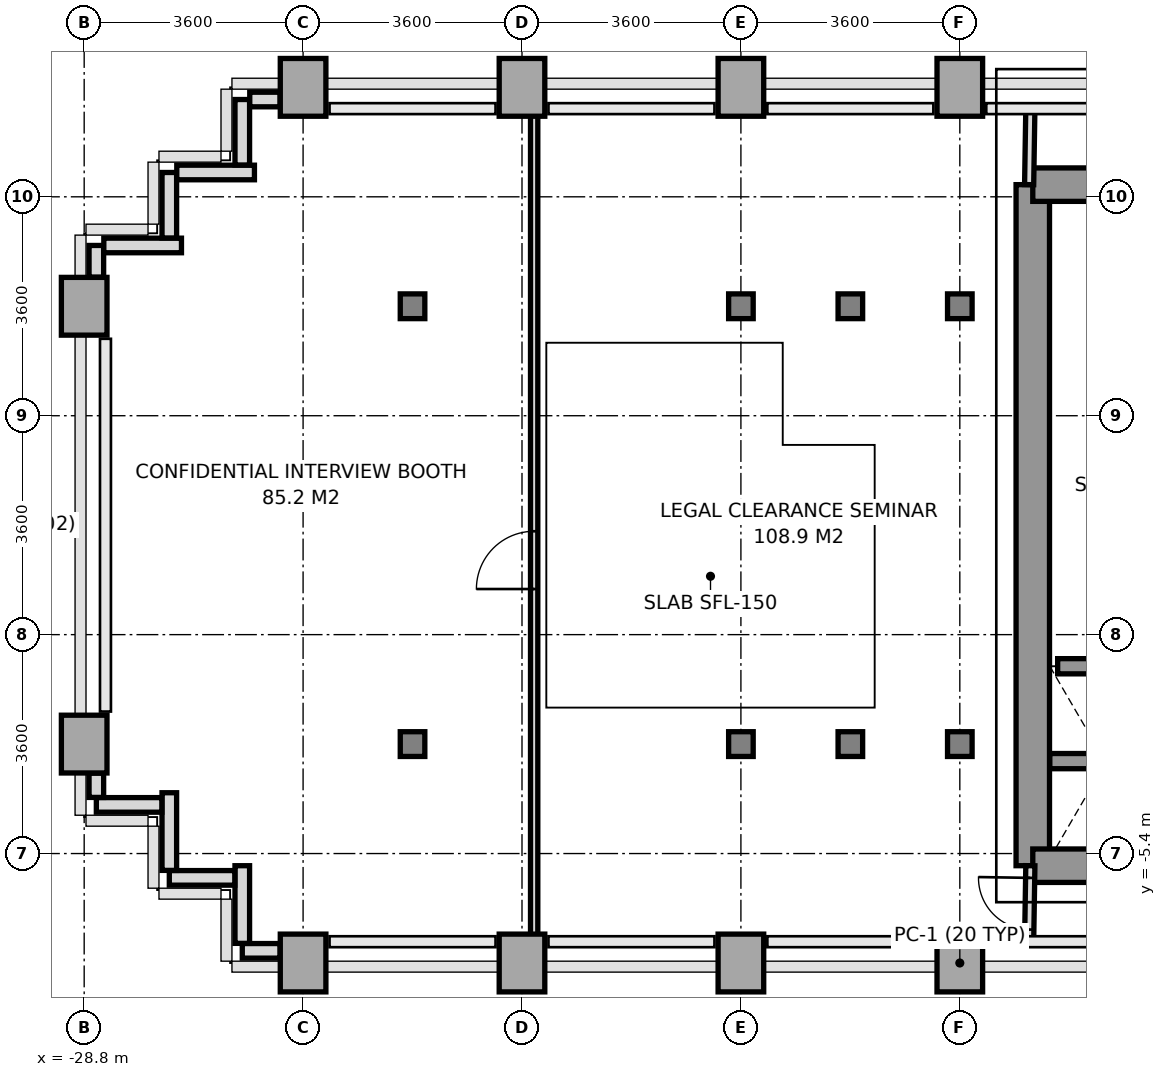
"""IFC4 building model, lengths in metres.
Left out: names, types, materials, properties, quantities, classifications, styles, units other than length and angle.
Written with IfcOpenShell. Run it as: python <this file> out.ifc"""

import sys

from ifc_helpers import new_model, si_unit, direction, frame, frame_2d, origin, origin_2d, place, context, subcontext, project, spatial, rectangle, i_section, extrude, source, transform, mapped, element, fill, save


model = new_model("IFC4")
c1 = context("Model", 3, precision=1e-05, world=origin(), true_north=direction((0.0, 1.0)))
c2 = subcontext(c1, "Body", "Model", "MODEL_VIEW")
j1 = project(units=[si_unit("LENGTHUNIT", "METRE"), si_unit("PLANEANGLEUNIT", "RADIAN")], contexts=[c1])
p1 = place(None, origin())
s1 = spatial("IfcSite", under=j1, at=p1, CompositionType="ELEMENT")
p2 = place(p1, origin())
s2 = spatial("IfcBuilding", under=s1, at=p2, CompositionType="ELEMENT")
p3 = place(p2, frame((0.0, 0.0, 61.2)))
s3 = spatial("IfcBuildingStorey", under=s2, at=p3, CompositionType="ELEMENT", Elevation=61.2)
m1 = source(origin(), c2, "Body", "SweptSolid", [
    extrude(rectangle(XDim=0.75, YDim=0.95, at=origin_2d()), origin(), (0.0, 0.0, 1.0), 3.2),
])
for number, where, z_axis, x_axis in (
    (1, (-28.8, -3.6, 0.0), (0.0, 0.0, 1.0), (1.0, 0.0, 0.0)),
    (2, (-28.8, 3.6, 0.0), (0.0, 0.0, 1.0), (1.0, 0.0, 0.0)),
    (3, (-25.2, -7.2, 0.0), (0.0, 0.0, 1.0), (1.0, 0.0, 0.0)),
    (4, (-25.2, 7.2, 0.0), (0.0, 0.0, 1.0), (1.0, 0.0, 0.0)),
):
    element("IfcColumn", number, at=place(p3, frame(where, z_axis=z_axis, x_axis=x_axis)), inside=s3, PredefinedType="COLUMN", context=c2, shape_type="MappedRepresentation", body=[
        mapped(m1, transform((0.0, 0.0, 0.0), x_axis=(1.0, 0.0, 0.0), y_axis=(0.0, 1.0, 0.0), z_axis=(0.0, 0.0, 1.0), scale=1.0)),
    ])
m2 = source(origin(), c2, "Body", "SweptSolid", [
    extrude(i_section(OverallWidth=0.404, OverallDepth=0.407, WebThickness=0.022, FlangeThickness=0.035, at=origin_2d()), origin(), (0.0, 0.0, 1.0), 3.2),
])
for number, where, z_axis, x_axis in (
    (5, (-23.4, -3.6, 0.0), (0.0, 0.0, 1.0), (1.0, 0.0, 0.0)),
    (6, (-23.4, 3.6, 0.0), (0.0, 0.0, 1.0), (1.0, 0.0, 0.0)),
):
    element("IfcColumn", number, at=place(p3, frame(where, z_axis=z_axis, x_axis=x_axis)), inside=s3, PredefinedType="COLUMN", context=c2, shape_type="MappedRepresentation", body=[
        mapped(m2, transform((0.0, 0.0, 0.0), x_axis=(1.0, 0.0, 0.0), y_axis=(0.0, 1.0, 0.0), z_axis=(0.0, 0.0, 1.0), scale=1.0)),
    ])
for number, where, z_axis, x_axis in (
    (7, (-21.6, -7.2, 0.0), (0.0, 0.0, 1.0), (1.0, 0.0, 0.0)),
    (8, (-21.6, 7.2, 0.0), (0.0, 0.0, 1.0), (1.0, 0.0, 0.0)),
    (9, (-18.0, -7.2, 0.0), (0.0, 0.0, 1.0), (1.0, 0.0, 0.0)),
):
    element("IfcColumn", number, at=place(p3, frame(where, z_axis=z_axis, x_axis=x_axis)), inside=s3, PredefinedType="COLUMN", context=c2, shape_type="MappedRepresentation", body=[
        mapped(m1, transform((0.0, 0.0, 0.0), x_axis=(1.0, 0.0, 0.0), y_axis=(0.0, 1.0, 0.0), z_axis=(0.0, 0.0, 1.0), scale=1.0)),
    ])
for number, where, z_axis, x_axis in (
    (10, (-18.0, -3.6, 0.0), (0.0, 0.0, 1.0), (1.0, 0.0, 0.0)),
    (11, (-18.0, 3.6, 0.0), (0.0, 0.0, 1.0), (1.0, 0.0, 0.0)),
):
    element("IfcColumn", number, at=place(p3, frame(where, z_axis=z_axis, x_axis=x_axis)), inside=s3, PredefinedType="COLUMN", context=c2, shape_type="MappedRepresentation", body=[
        mapped(m2, transform((0.0, 0.0, 0.0), x_axis=(1.0, 0.0, 0.0), y_axis=(0.0, 1.0, 0.0), z_axis=(0.0, 0.0, 1.0), scale=1.0)),
    ])
p4 = place(p3, frame((-18.0, 7.2, 0.0), z_axis=(0.0, 0.0, 1.0), x_axis=(1.0, 0.0, 0.0)))
e12 = element("IfcColumn", 12, at=p4, inside=s3, PredefinedType="COLUMN", context=c2, shape_type="MappedRepresentation", body=[
    mapped(m1, transform((0.0, 0.0, 0.0), x_axis=(1.0, 0.0, 0.0), y_axis=(0.0, 1.0, 0.0), z_axis=(0.0, 0.0, 1.0), scale=1.0)),
])
for number, where, z_axis, x_axis in (
    (13, (-16.2, -3.6, 0.0), (0.0, 0.0, 1.0), (1.0, 0.0, 0.0)),
    (14, (-16.2, 3.6, 0.0), (0.0, 0.0, 1.0), (1.0, 0.0, 0.0)),
):
    element("IfcColumn", number, at=place(p3, frame(where, z_axis=z_axis, x_axis=x_axis)), inside=s3, PredefinedType="COLUMN", context=c2, shape_type="MappedRepresentation", body=[
        mapped(m2, transform((0.0, 0.0, 0.0), x_axis=(1.0, 0.0, 0.0), y_axis=(0.0, 1.0, 0.0), z_axis=(0.0, 0.0, 1.0), scale=1.0)),
    ])
p5 = place(p3, frame((-14.4, -7.2, 0.0), z_axis=(0.0, 0.0, 1.0), x_axis=(1.0, 0.0, 0.0)))
e15 = element("IfcColumn", 15, at=p5, inside=s3, PredefinedType="COLUMN", context=c2, shape_type="MappedRepresentation", body=[
    mapped(m1, transform((0.0, 0.0, 0.0), x_axis=(1.0, 0.0, 0.0), y_axis=(0.0, 1.0, 0.0), z_axis=(0.0, 0.0, 1.0), scale=1.0)),
])
for number, where, z_axis, x_axis in (
    (16, (-14.4, -3.6, 0.0), (0.0, 0.0, 1.0), (1.0, 0.0, 0.0)),
    (17, (-14.4, 3.6, 0.0), (0.0, 0.0, 1.0), (1.0, 0.0, 0.0)),
):
    element("IfcColumn", number, at=place(p3, frame(where, z_axis=z_axis, x_axis=x_axis)), inside=s3, PredefinedType="COLUMN", context=c2, shape_type="MappedRepresentation", body=[
        mapped(m2, transform((0.0, 0.0, 0.0), x_axis=(1.0, 0.0, 0.0), y_axis=(0.0, 1.0, 0.0), z_axis=(0.0, 0.0, 1.0), scale=1.0)),
    ])
p6 = place(p3, frame((-14.4, 7.2, 0.0), z_axis=(0.0, 0.0, 1.0), x_axis=(1.0, 0.0, 0.0)))
e18 = element("IfcColumn", 18, at=p6, inside=s3, PredefinedType="COLUMN", context=c2, shape_type="MappedRepresentation", body=[
    mapped(m1, transform((0.0, 0.0, 0.0), x_axis=(1.0, 0.0, 0.0), y_axis=(0.0, 1.0, 0.0), z_axis=(0.0, 0.0, 1.0), scale=1.0)),
])
p7 = place(p3, frame((-25.578, -7.0, 0.0), z_axis=(0.0, 0.0, 1.0), x_axis=(-1.0, 0.0, 0.0)))
e19 = element("IfcWall", 19, at=p7, inside=s3, PredefinedType="PARAPET", context=c2, shape_type="SweptSolid", body=[
    extrude(rectangle(XDim=0.622, YDim=0.24, at=frame_2d((0.311, 0.0))), origin(), (0.0, 0.0, 1.0), 1.15),
])
p8 = place(p3, frame((-26.2, -6.877, 0.0), z_axis=(0.0, 0.0, 1.0), x_axis=(0.0, 1.0, 0.0)))
e20 = element("IfcWall", 20, at=p8, inside=s3, PredefinedType="PARAPET", context=c2, shape_type="SweptSolid", body=[
    extrude(rectangle(XDim=1.277, YDim=0.24, at=frame_2d((0.638, 0.0))), origin(), (0.0, 0.0, 1.0), 1.15),
])
p9 = place(p3, frame((-26.323, -5.8, 0.0), z_axis=(0.0, 0.0, 1.0), x_axis=(-1.0, 0.0, 0.0)))
e21 = element("IfcWall", 21, at=p9, inside=s3, PredefinedType="PARAPET", context=c2, shape_type="SweptSolid", body=[
    extrude(rectangle(XDim=1.077, YDim=0.24, at=frame_2d((0.539, 0.0))), origin(), (0.0, 0.0, 1.0), 1.15),
])
p10 = place(p3, frame((-27.4, -5.677, 0.0), z_axis=(0.0, 0.0, 1.0), x_axis=(0.0, 1.0, 0.0)))
e22 = element("IfcWall", 22, at=p10, inside=s3, PredefinedType="PARAPET", context=c2, shape_type="SweptSolid", body=[
    extrude(rectangle(XDim=1.277, YDim=0.24, at=frame_2d((0.639, 0.0))), origin(), (0.0, 0.0, 1.0), 1.15),
])
p11 = place(p3, frame((-27.523, -4.6, 0.0), z_axis=(0.0, 0.0, 1.0), x_axis=(-1.0, 0.0, 0.0)))
e23 = element("IfcWall", 23, at=p11, inside=s3, PredefinedType="PARAPET", context=c2, shape_type="SweptSolid", body=[
    extrude(rectangle(XDim=1.077, YDim=0.24, at=frame_2d((0.539, 0.0))), origin(), (0.0, 0.0, 1.0), 1.15),
])
p12 = place(p3, frame((-28.6, -4.477, 0.0), z_axis=(0.0, 0.0, 1.0), x_axis=(0.0, 1.0, 0.0)))
e24 = element("IfcWall", 24, at=p12, inside=s3, PredefinedType="PARAPET", context=c2, shape_type="SweptSolid", body=[
    extrude(rectangle(XDim=0.399, YDim=0.24, at=frame_2d((0.2, 0.0))), origin(), (0.0, 0.0, 1.0), 1.15),
])
p13 = place(p3, frame((-28.6, 4.078, 0.0), z_axis=(0.0, 0.0, 1.0), x_axis=(0.0, 1.0, 0.0)))
e25 = element("IfcWall", 25, at=p13, inside=s3, PredefinedType="PARAPET", context=c2, shape_type="SweptSolid", body=[
    extrude(rectangle(XDim=0.522, YDim=0.24, at=frame_2d((0.261, 0.0))), origin(), (0.0, 0.0, 1.0), 1.15),
])
p14 = place(p3, frame((-28.477, 4.6, 0.0), z_axis=(0.0, 0.0, 1.0), x_axis=(1.0, 0.0, 0.0)))
e26 = element("IfcWall", 26, at=p14, inside=s3, PredefinedType="PARAPET", context=c2, shape_type="SweptSolid", body=[
    extrude(rectangle(XDim=1.277, YDim=0.24, at=frame_2d((0.639, 0.0))), origin(), (0.0, 0.0, 1.0), 1.15),
])
p15 = place(p3, frame((-27.4, 4.723, 0.0), z_axis=(0.0, 0.0, 1.0), x_axis=(0.0, 1.0, 0.0)))
e27 = element("IfcWall", 27, at=p15, inside=s3, PredefinedType="PARAPET", context=c2, shape_type="SweptSolid", body=[
    extrude(rectangle(XDim=1.077, YDim=0.24, at=frame_2d((0.539, 0.0))), origin(), (0.0, 0.0, 1.0), 1.15),
])
p16 = place(p3, frame((-27.277, 5.8, 0.0), z_axis=(0.0, 0.0, 1.0), x_axis=(1.0, 0.0, 0.0)))
e28 = element("IfcWall", 28, at=p16, inside=s3, PredefinedType="PARAPET", context=c2, shape_type="SweptSolid", body=[
    extrude(rectangle(XDim=1.277, YDim=0.24, at=frame_2d((0.639, 0.0))), origin(), (0.0, 0.0, 1.0), 1.15),
])
p17 = place(p3, frame((-26.2, 5.923, 0.0), z_axis=(0.0, 0.0, 1.0), x_axis=(0.0, 1.0, 0.0)))
e29 = element("IfcWall", 29, at=p17, inside=s3, PredefinedType="PARAPET", context=c2, shape_type="SweptSolid", body=[
    extrude(rectangle(XDim=1.077, YDim=0.24, at=frame_2d((0.539, 0.0))), origin(), (0.0, 0.0, 1.0), 1.15),
])
p18 = place(p3, frame((-26.077, 7.0, 0.0), z_axis=(0.0, 0.0, 1.0), x_axis=(1.0, 0.0, 0.0)))
e30 = element("IfcWall", 30, at=p18, inside=s3, PredefinedType="PARAPET", context=c2, shape_type="SweptSolid", body=[
    extrude(rectangle(XDim=0.499, YDim=0.24, at=frame_2d((0.25, 0.0))), origin(), (0.0, 0.0, 1.0), 1.15),
])
p19 = place(p3, frame((-13.2, -5.6, 0.0), z_axis=(0.0, 0.0, 1.0), x_axis=(0.0, 1.0, 0.0)))
e31 = element("IfcWall", 31, at=p19, inside=s3, PredefinedType="SHEAR", context=c2, shape_type="SweptSolid", body=[
    extrude(rectangle(XDim=11.2, YDim=0.55, at=frame_2d((5.6, 0.0))), origin(), (0.0, 0.0, 1.0), 3.2),
])
p20 = place(p3, frame((-13.2, 5.6, 0.0), z_axis=(0.0, 0.0, 1.0), x_axis=(1.0, 0.0, 0.0)))
e32 = element("IfcWall", 32, at=p20, inside=s3, PredefinedType="SHEAR", context=c2, shape_type="SweptSolid", body=[
    extrude(rectangle(XDim=1.819, YDim=0.55, at=frame_2d((0.909, 0.0))), origin(), (0.0, 0.0, 1.0), 3.2),
])
p21 = place(p3, frame((-13.2, -5.6, 0.0), z_axis=(0.0, 0.0, 1.0), x_axis=(1.0, 0.0, 0.0)))
e33 = element("IfcWall", 33, at=p21, inside=s3, PredefinedType="SHEAR", context=c2, shape_type="SweptSolid", body=[
    extrude(rectangle(XDim=7.8, YDim=0.55, at=frame_2d((3.9, 0.0))), origin(), (0.0, 0.0, 1.0), 3.2),
])
p22 = place(p21, frame((3.6, 0.0, 0.0)))
e34 = element("IfcOpeningElement", 34, at=p22, cuts=e33, PredefinedType="OPENING", context=c2, shape_type="SweptSolid", body=[
    extrude(rectangle(XDim=1.2, YDim=2.2, at=frame_2d((0.6, 1.1))), frame((0.0, 0.285, 0.0), z_axis=(0.0, -1.0, 0.0), x_axis=(1.0, 0.0, 0.0)), (0.0, 0.0, 1.0), 0.57),
])
p23 = place(p3, frame((-12.92, -3.88, 0.0), z_axis=(0.0, 0.0, 1.0), x_axis=(1.0, 0.0, 0.0)))
e35 = element("IfcWall", 35, at=p23, inside=s3, PredefinedType="SOLIDWALL", context=c2, shape_type="SweptSolid", body=[
    extrude(rectangle(XDim=1.84, YDim=0.25, at=frame_2d((0.92, 0.0))), origin(), (0.0, 0.0, 1.0), 3.2),
])
p24 = place(p3, frame((-12.791, -2.32, 0.0), z_axis=(0.0, 0.0, 1.0), x_axis=(1.0, 0.0, 0.0)))
e36 = element("IfcWall", 36, at=p24, inside=s3, PredefinedType="SOLIDWALL", context=c2, shape_type="SweptSolid", body=[
    extrude(rectangle(XDim=1.582, YDim=0.25, at=frame_2d((0.791, 0.0))), origin(), (0.0, 0.0, 1.0), 3.2),
])
p25 = place(p3, frame((-13.26, 5.6, 0.0), z_axis=(0.0, 0.0, 1.0), x_axis=(0.016013571389, 0.999871774545, 0.0)))
e37 = element("IfcWall", 37, at=p25, inside=s3, PredefinedType="PARTITIONING", context=c2, shape_type="SweptSolid", body=[
    extrude(rectangle(XDim=1.25, YDim=0.15, at=frame_2d((0.625, 0.0))), origin(), (0.0, 0.0, 1.0), 3.2),
])
p26 = place(p3, frame((-13.26, -6.85, 0.0), z_axis=(0.0, 0.0, 1.0), x_axis=(0.016013571389, 0.999871774545, 0.0)))
e38 = element("IfcWall", 38, at=p26, inside=s3, PredefinedType="PARTITIONING", context=c2, shape_type="SweptSolid", body=[
    extrude(rectangle(XDim=1.25, YDim=0.15, at=frame_2d((0.625, 0.0))), origin(), (0.0, 0.0, 1.0), 3.2),
])
p27 = place(p26, frame((0.2, 0.0, 0.0)))
e39 = element("IfcOpeningElement", 39, at=p27, cuts=e38, PredefinedType="OPENING", context=c2, shape_type="SweptSolid", body=[
    extrude(rectangle(XDim=0.85, YDim=2.1, at=frame_2d((0.425, 1.05))), frame((0.0, 0.085, 0.0), z_axis=(0.0, -1.0, 0.0), x_axis=(1.0, 0.0, 0.0)), (0.0, 0.0, 1.0), 0.17),
])
p28 = place(p3, frame((-21.4, -6.85, 0.0), z_axis=(0.0, 0.0, 1.0), x_axis=(0.0, 1.0, 0.0)))
e40 = element("IfcWall", 40, at=p28, inside=s3, PredefinedType="PARTITIONING", context=c2, shape_type="SweptSolid", body=[
    extrude(rectangle(XDim=13.7, YDim=0.12, at=frame_2d((6.85, 0.0))), origin(), (0.0, 0.0, 1.0), 2.71),
])
p29 = place(p28, frame((5.8, 0.0, 0.0)))
e41 = element("IfcOpeningElement", 41, at=p29, cuts=e40, PredefinedType="OPENING", context=c2, shape_type="SweptSolid", body=[
    extrude(rectangle(XDim=0.95, YDim=2.15, at=frame_2d((0.475, 1.075))), frame((0.0, 0.07, 0.0), z_axis=(0.0, -1.0, 0.0), x_axis=(1.0, 0.0, 0.0)), (0.0, 0.0, 1.0), 0.14),
])
m3 = source(origin(), c2, "Body", "SweptSolid", [
    extrude(rectangle(XDim=0.85, YDim=2.1, at=frame_2d((0.425, 1.05))), frame((0.0, 0.025, 0.0), z_axis=(0.0, -1.0, 0.0), x_axis=(1.0, 0.0, 0.0)), (0.0, 0.0, 1.0), 0.05),
])
p30 = place(p27, origin())
e42 = element("IfcDoor", 42, at=p30, inside=s3, OperationType="SINGLE_SWING_RIGHT", PredefinedType="DOOR", context=c2, shape_type="MappedRepresentation", body=[
    mapped(m3, transform((0.0, 0.0, 0.0), x_axis=(1.0, 0.0, 0.0), y_axis=(0.0, 1.0, 0.0), z_axis=(0.0, 0.0, 1.0), scale=1.0)),
])
fill(e39, e42)
m4 = source(origin(), c2, "Body", "SweptSolid", [
    extrude(rectangle(XDim=0.95, YDim=2.15, at=frame_2d((0.475, 1.075))), frame((0.0, 0.025, 0.0), z_axis=(0.0, -1.0, 0.0), x_axis=(1.0, 0.0, 0.0)), (0.0, 0.0, 1.0), 0.05),
])
p31 = place(p29, origin())
e43 = element("IfcDoor", 43, at=p31, inside=s3, OperationType="SINGLE_SWING_LEFT", PredefinedType="DOOR", context=c2, shape_type="MappedRepresentation", body=[
    mapped(m4, transform((0.0, 0.0, 0.0), x_axis=(1.0, 0.0, 0.0), y_axis=(0.0, 1.0, 0.0), z_axis=(0.0, 0.0, 1.0), scale=1.0)),
])
fill(e41, e43)
save(model, sys.argv[1])
